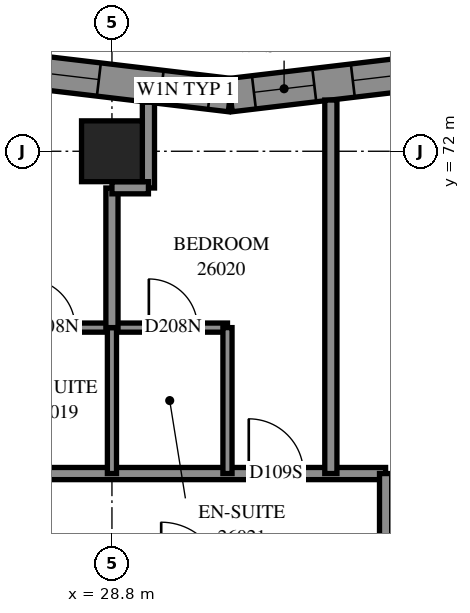
"""IFC4 building model, lengths in metres.
Left out: names, types, materials, properties, quantities, classifications, styles, units other than length and angle.
Written with IfcOpenShell. Run it as: python <this file> out.ifc"""

import sys

from ifc_helpers import new_model, si_unit, direction, frame, frame_2d, origin, origin_2d, place, context, subcontext, project, spatial, polyline, rectangle, outline, extrude, element, fill, save


model = new_model("IFC4")
c1 = context("Model", 3, precision=1e-05, world=origin(), true_north=direction((0.0, 1.0)))
c2 = subcontext(c1, "Body", "Model", "MODEL_VIEW")
j1 = project(units=[si_unit("LENGTHUNIT", "METRE"), si_unit("PLANEANGLEUNIT", "RADIAN")], contexts=[c1])
p1 = place(None, origin())
s1 = spatial("IfcSite", under=j1, at=p1, CompositionType="ELEMENT")
p2 = place(p1, origin())
s2 = spatial("IfcBuilding", under=s1, at=p2, CompositionType="ELEMENT")
p3 = place(p2, frame((0.0, 0.0, 98.2)))
s3 = spatial("IfcBuildingStorey", under=s2, at=p3, CompositionType="ELEMENT", Elevation=98.2)
p4 = place(p3, frame((28.8, 72.0, 0.0), z_axis=(0.0, 0.0, 1.0), x_axis=(1.0, 0.0, 0.0)))
e1 = element("IfcColumn", 1, at=p4, inside=s3, PredefinedType="COLUMN", context=c2, shape_type="SweptSolid", body=[
    extrude(rectangle(XDim=1.0, YDim=1.0, at=origin_2d()), origin(), (0.0, 0.0, 1.0), 3.1),
])
p5 = place(p3, frame((34.545, 73.374, 0.0), z_axis=(0.0, 0.0, 1.0), x_axis=(-0.9930269402, -0.1178876415, 0.0)))
e2 = element("IfcWall", 2, at=p5, inside=s3, PredefinedType="SOLIDWALL", context=c2, shape_type="SweptSolid", body=[
    extrude(outline(polyline([(-0.033, -0.275), (3.793, -0.275), (3.858, 0.275), (0.033, 0.275), (-0.033, -0.275)])), origin(), (0.0, 0.0, 1.0), 3.1),
])
p6 = place(p5, frame((0.596, 0.0, 0.5)))
e3 = element("IfcOpeningElement", 3, at=p6, cuts=e2, PredefinedType="OPENING", context=c2, shape_type="SweptSolid", body=[
    extrude(rectangle(XDim=1.2, YDim=2.45, at=frame_2d((0.6, 1.225))), frame((0.0, 0.285, 0.0), z_axis=(0.0, -1.0, 0.0), x_axis=(1.0, 0.0, 0.0)), (0.0, 0.0, 1.0), 0.57),
])
p7 = place(p5, frame((2.434, 0.0, 0.45)))
e4 = element("IfcOpeningElement", 4, at=p7, cuts=e2, PredefinedType="OPENING", context=c2, shape_type="SweptSolid", body=[
    extrude(rectangle(XDim=1.0, YDim=2.5, at=frame_2d((0.5, 1.25))), frame((0.0, 0.285, 0.0), z_axis=(0.0, -1.0, 0.0), x_axis=(1.0, 0.0, 0.0)), (0.0, 0.0, 1.0), 0.57),
])
p8 = place(p3, frame((30.746, 72.923, 0.0), z_axis=(0.0, 0.0, 1.0), x_axis=(-0.9930269402, 0.1178876415, 0.0)))
e5 = element("IfcWall", 5, at=p8, inside=s3, PredefinedType="SOLIDWALL", context=c2, shape_type="SweptSolid", body=[
    extrude(outline(polyline([(0.033, -0.275), (3.858, -0.275), (3.793, 0.275), (-0.033, 0.275), (0.033, -0.275)])), origin(), (0.0, 0.0, 1.0), 3.1),
])
p9 = place(p8, frame((2.176, 0.0, 0.5)))
e6 = element("IfcOpeningElement", 6, at=p9, cuts=e5, PredefinedType="OPENING", context=c2, shape_type="SweptSolid", body=[
    extrude(rectangle(XDim=1.2, YDim=2.45, at=frame_2d((0.6, 1.225))), frame((0.0, 0.285, 0.0), z_axis=(0.0, -1.0, 0.0), x_axis=(1.0, 0.0, 0.0)), (0.0, 0.0, 1.0), 0.57),
])
p10 = place(p8, frame((0.337, 0.0, 0.45)))
e7 = element("IfcOpeningElement", 7, at=p10, cuts=e5, PredefinedType="OPENING", context=c2, shape_type="SweptSolid", body=[
    extrude(rectangle(XDim=0.8, YDim=2.5, at=frame_2d((0.4, 1.25))), frame((0.0, 0.285, 0.0), z_axis=(0.0, -1.0, 0.0), x_axis=(1.0, 0.0, 0.0)), (0.0, 0.0, 1.0), 0.57),
])
p11 = place(p3, frame((21.602, 66.7, 0.0), z_axis=(0.0, 0.0, 1.0), x_axis=(1.0, 0.0, 0.0)))
e8 = element("IfcWall", 8, at=p11, inside=s3, PredefinedType="PARTITIONING", context=c2, shape_type="SweptSolid", body=[
    extrude(rectangle(XDim=11.698, YDim=0.2, at=frame_2d((5.849, 0.0))), origin(), (0.0, 0.0, 1.0), 3.1),
])
p12 = place(p11, frame((1.79, 0.0, 0.0)))
e9 = element("IfcOpeningElement", 9, at=p12, cuts=e8, PredefinedType="OPENING", context=c2, shape_type="SweptSolid", body=[
    extrude(rectangle(XDim=1.0, YDim=2.1, at=frame_2d((0.5, 1.05))), frame((0.0, 0.11, 0.0), z_axis=(0.0, -1.0, 0.0), x_axis=(1.0, 0.0, 0.0)), (0.0, 0.0, 1.0), 0.22),
])
p13 = place(p11, frame((3.998, 0.0, 0.0)))
e10 = element("IfcOpeningElement", 10, at=p13, cuts=e8, PredefinedType="OPENING", context=c2, shape_type="SweptSolid", body=[
    extrude(rectangle(XDim=0.9, YDim=2.1, at=frame_2d((0.45, 1.05))), frame((0.0, 0.11, 0.0), z_axis=(0.0, -1.0, 0.0), x_axis=(1.0, 0.0, 0.0)), (0.0, 0.0, 1.0), 0.22),
])
p14 = place(p11, frame((9.448, 0.0, 0.0)))
e11 = element("IfcOpeningElement", 11, at=p14, cuts=e8, PredefinedType="OPENING", context=c2, shape_type="SweptSolid", body=[
    extrude(rectangle(XDim=0.9, YDim=2.1, at=frame_2d((0.45, 1.05))), frame((0.0, 0.11, 0.0), z_axis=(0.0, -1.0, 0.0), x_axis=(1.0, 0.0, 0.0)), (0.0, 0.0, 1.0), 0.22),
])
p15 = place(p3, frame((32.4, 66.7, 0.0), z_axis=(0.0, 0.0, 1.0), x_axis=(0.0, 1.0, 0.0)))
e12 = element("IfcWall", 12, at=p15, inside=s3, PredefinedType="PARTITIONING", context=c2, shape_type="SweptSolid", body=[
    extrude(rectangle(XDim=6.143, YDim=0.2, at=frame_2d((3.071, 0.0))), origin(), (0.0, 0.0, 1.0), 3.1),
])
p16 = place(p3, frame((33.3, 62.102, 0.0), z_axis=(0.0, 0.0, 1.0), x_axis=(0.0, 1.0, 0.0)))
e13 = element("IfcWall", 13, at=p16, inside=s3, PredefinedType="PARTITIONING", context=c2, shape_type="SweptSolid", body=[
    extrude(rectangle(XDim=4.598, YDim=0.2, at=frame_2d((2.299, 0.0))), origin(), (0.0, 0.0, 1.0), 3.1),
])
p17 = place(p16, frame((2.501, 0.0, 0.0)))
e14 = element("IfcOpeningElement", 14, at=p17, cuts=e13, PredefinedType="OPENING", context=c2, shape_type="SweptSolid", body=[
    extrude(rectangle(XDim=0.9, YDim=2.1, at=frame_2d((0.45, 1.05))), frame((0.0, 0.11, 0.0), z_axis=(0.0, -1.0, 0.0), x_axis=(1.0, 0.0, 0.0)), (0.0, 0.0, 1.0), 0.22),
])
p18 = place(p3, frame((26.9, 69.1, 0.0), z_axis=(0.0, 0.0, 1.0), x_axis=(1.0, 0.0, 0.0)))
e15 = element("IfcWall", 15, at=p18, inside=s3, PredefinedType="PARTITIONING", context=c2, shape_type="SweptSolid", body=[
    extrude(rectangle(XDim=3.8, YDim=0.15, at=frame_2d((1.9, 0.0))), origin(), (0.0, 0.0, 1.0), 3.1),
])
p19 = place(p18, frame((0.493, 0.0, 0.0)))
e16 = element("IfcOpeningElement", 16, at=p19, cuts=e15, PredefinedType="OPENING", context=c2, shape_type="SweptSolid", body=[
    extrude(rectangle(XDim=0.8, YDim=2.1, at=frame_2d((0.4, 1.05))), frame((0.0, 0.085, 0.0), z_axis=(0.0, -1.0, 0.0), x_axis=(1.0, 0.0, 0.0)), (0.0, 0.0, 1.0), 0.17),
])
p20 = place(p18, frame((2.507, 0.0, 0.0)))
e17 = element("IfcOpeningElement", 17, at=p20, cuts=e15, PredefinedType="OPENING", context=c2, shape_type="SweptSolid", body=[
    extrude(rectangle(XDim=0.8, YDim=2.1, at=frame_2d((0.4, 1.05))), frame((0.0, 0.085, 0.0), z_axis=(0.0, -1.0, 0.0), x_axis=(1.0, 0.0, 0.0)), (0.0, 0.0, 1.0), 0.17),
])
for number, where, z_axis, x_axis in (
    (18, (28.8, 66.7, 0.0), (0.0, 0.0, 1.0), (0.0, 1.0, 0.0)),
    (19, (30.7, 66.7, 0.0), (0.0, 0.0, 1.0), (0.0, 1.0, 0.0)),
):
    element("IfcWall", number, at=place(p3, frame(where, z_axis=z_axis, x_axis=x_axis)), inside=s3, PredefinedType="PARTITIONING", context=c2, shape_type="SweptSolid", body=[
        extrude(rectangle(XDim=2.4, YDim=0.15, at=frame_2d((1.2, 0.0))), origin(), (0.0, 0.0, 1.0), 3.1),
    ])
p21 = place(p3, frame((28.8, 69.1, 0.0), z_axis=(0.0, 0.0, 1.0), x_axis=(0.0, 1.0, 0.0)))
e20 = element("IfcWall", 20, at=p21, inside=s3, PredefinedType="PARTITIONING", context=c2, shape_type="SweptSolid", body=[
    extrude(rectangle(XDim=2.296, YDim=0.2, at=frame_2d((1.148, 0.0))), origin(), (0.0, 0.0, 1.0), 3.1),
])
p22 = place(p3, frame((29.4, 71.396, 0.0), z_axis=(0.0, 0.0, 1.0), x_axis=(0.0, 1.0, 0.0)))
e21 = element("IfcWall", 21, at=p22, inside=s3, PredefinedType="PARTITIONING", context=c2, shape_type="SweptSolid", body=[
    extrude(rectangle(XDim=1.41, YDim=0.2, at=frame_2d((0.705, 0.0))), origin(), (0.0, 0.0, 1.0), 3.1),
])
p23 = place(p3, frame((28.8, 71.4, 0.0), z_axis=(0.0, 0.0, 1.0), x_axis=(1.0, 0.0, 0.0)))
e22 = element("IfcWall", 22, at=p23, inside=s3, PredefinedType="PARTITIONING", context=c2, shape_type="SweptSolid", body=[
    extrude(rectangle(XDim=0.6, YDim=0.2, at=frame_2d((0.3, 0.0))), origin(), (0.0, 0.0, 1.0), 3.1),
])
p24 = place(p6, origin())
e23 = element("IfcWindow", 23, at=p24, inside=s3, PartitioningType="SINGLE_PANEL", PredefinedType="WINDOW", context=c2, shape_type="SweptSolid", body=[
    extrude(rectangle(XDim=1.2, YDim=2.45, at=frame_2d((0.6, 1.225))), frame((0.0, 0.155, 0.0), z_axis=(0.0, -1.0, 0.0), x_axis=(1.0, 0.0, 0.0)), (0.0, 0.0, 1.0), 0.06),
])
fill(e3, e23)
p25 = place(p9, origin())
e24 = element("IfcWindow", 24, at=p25, inside=s3, PartitioningType="SINGLE_PANEL", PredefinedType="WINDOW", context=c2, shape_type="SweptSolid", body=[
    extrude(rectangle(XDim=1.2, YDim=2.45, at=frame_2d((0.6, 1.225))), frame((0.0, 0.155, 0.0), z_axis=(0.0, -1.0, 0.0), x_axis=(1.0, 0.0, 0.0)), (0.0, 0.0, 1.0), 0.06),
])
fill(e6, e24)
p26 = place(p19, origin())
e25 = element("IfcDoor", 25, at=p26, inside=s3, OperationType="SINGLE_SWING_RIGHT", PredefinedType="DOOR", context=c2, shape_type="SweptSolid", body=[
    extrude(rectangle(XDim=0.8, YDim=2.1, at=frame_2d((0.4, 1.05))), frame((0.0, 0.025, 0.0), z_axis=(0.0, -1.0, 0.0), x_axis=(1.0, 0.0, 0.0)), (0.0, 0.0, 1.0), 0.05),
])
fill(e16, e25)
p27 = place(p14, origin())
e26 = element("IfcDoor", 26, at=p27, inside=s3, OperationType="SINGLE_SWING_RIGHT", PredefinedType="DOOR", context=c2, shape_type="SweptSolid", body=[
    extrude(rectangle(XDim=0.9, YDim=2.1, at=frame_2d((0.45, 1.05))), frame((0.0, 0.025, 0.0), z_axis=(0.0, -1.0, 0.0), x_axis=(1.0, 0.0, 0.0)), (0.0, 0.0, 1.0), 0.05),
])
fill(e11, e26)
p28 = place(p20, origin())
e27 = element("IfcDoor", 27, at=p28, inside=s3, OperationType="SINGLE_SWING_RIGHT", PredefinedType="DOOR", context=c2, shape_type="SweptSolid", body=[
    extrude(rectangle(XDim=0.8, YDim=2.1, at=frame_2d((0.4, 1.05))), frame((0.0, 0.025, 0.0), z_axis=(0.0, -1.0, 0.0), x_axis=(1.0, 0.0, 0.0)), (0.0, 0.0, 1.0), 0.05),
])
fill(e17, e27)
p29 = place(p7, origin())
e28 = element("IfcWindow", 28, at=p29, inside=s3, PartitioningType="SINGLE_PANEL", PredefinedType="WINDOW", context=c2, shape_type="SweptSolid", body=[
    extrude(rectangle(XDim=1.0, YDim=2.5, at=frame_2d((0.5, 1.25))), frame((0.0, 0.155, 0.0), z_axis=(0.0, -1.0, 0.0), x_axis=(1.0, 0.0, 0.0)), (0.0, 0.0, 1.0), 0.06),
])
fill(e4, e28)
p30 = place(p10, origin())
e29 = element("IfcWindow", 29, at=p30, inside=s3, PartitioningType="SINGLE_PANEL", PredefinedType="WINDOW", context=c2, shape_type="SweptSolid", body=[
    extrude(rectangle(XDim=0.8, YDim=2.5, at=frame_2d((0.4, 1.25))), frame((0.0, 0.155, 0.0), z_axis=(0.0, -1.0, 0.0), x_axis=(1.0, 0.0, 0.0)), (0.0, 0.0, 1.0), 0.06),
])
fill(e7, e29)
save(model, sys.argv[1])
